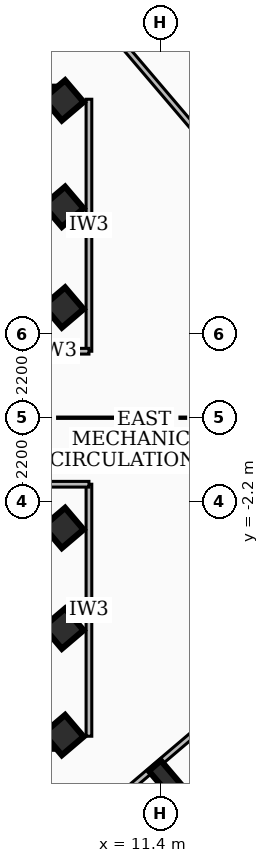
"""IFC4 building model, lengths in metres.
Left out: names, types, materials, properties, quantities, classifications, styles, units other than length and angle.
Written with IfcOpenShell. Run it as: python <this file> out.ifc"""

import sys

from ifc_helpers import new_model, si_unit, direction, frame, frame_2d, origin, origin_2d, place, context, subcontext, project, spatial, rectangle, i_section, extrude, element, save


model = new_model("IFC4")
c1 = context("Model", 3, precision=1e-05, world=origin(), true_north=direction((0.0, 1.0)))
c2 = subcontext(c1, "Body", "Model", "MODEL_VIEW")
j1 = project(units=[si_unit("LENGTHUNIT", "METRE"), si_unit("PLANEANGLEUNIT", "RADIAN")], contexts=[c1])
p1 = place(None, origin())
s1 = spatial("IfcSite", under=j1, at=p1, CompositionType="ELEMENT")
p2 = place(p1, origin())
s2 = spatial("IfcBuilding", under=s1, at=p2, CompositionType="ELEMENT")
p3 = place(p2, frame((0.0, 0.0, 239.4)))
s3 = spatial("IfcBuildingStorey", under=s2, at=p3, CompositionType="ELEMENT", Elevation=239.4)
for number, where, z_axis, x_axis in (
    (1, (-8.78, 8.51, 0.0), (0.0, 0.0, 1.0), (1.0, 0.0, 0.0)),
    (2, (8.78, -8.51, 0.0), (0.0, 0.0, 1.0), (-1.0, 0.0, 0.0)),
):
    element("IfcWall", number, at=place(p3, frame(where, z_axis=z_axis, x_axis=x_axis)), inside=s3, PredefinedType="SHEAR", context=c2, shape_type="SweptSolid", body=[
        extrude(rectangle(XDim=17.56, YDim=0.4, at=frame_2d((8.78, 0.0))), origin(), (0.0, 0.0, 1.0), 4.42),
    ])
for number, where, z_axis, x_axis in (
    (3, (8.85, -5.55, 0.0), (0.0, 0.0, 1.0), (0.762, 0.648, 0.0)),
    (4, (8.85, -2.9, 0.0), (0.0, 0.0, 1.0), (0.762, 0.648, 0.0)),
    (5, (8.85, 2.9, 0.0), (0.0, 0.0, 1.0), (0.762, 0.648, 0.0)),
    (6, (8.85, 5.55, 0.0), (0.0, 0.0, 1.0), (0.762, 0.648, 0.0)),
    (7, (8.85, -8.35, 0.0), (0.0, 0.0, 1.0), (0.762, 0.648, 0.0)),
    (8, (8.85, 8.35, 0.0), (0.0, 0.0, 1.0), (0.762, 0.648, 0.0)),
):
    element("IfcColumn", number, at=place(p3, frame(where, z_axis=z_axis, x_axis=x_axis)), inside=s3, PredefinedType="COLUMN", context=c2, shape_type="SweptSolid", body=[
        extrude(rectangle(XDim=0.75, YDim=0.75, at=origin_2d()), origin(), (0.0, 0.0, 1.0), 4.68),
    ])
p4 = place(p3, frame((11.554, -9.51, 0.0), z_axis=(0.0, 0.0, 1.0), x_axis=(0.761538307537, 0.648119901063, 0.0)))
e9 = element("IfcColumn", 9, at=p4, inside=s3, PredefinedType="COLUMN", context=c2, shape_type="SweptSolid", body=[
    extrude(i_section(OverallWidth=0.418, OverallDepth=0.927, WebThickness=0.019, FlangeThickness=0.032, at=origin_2d()), origin(), (0.0, 0.0, 1.0), 4.68),
])
p5 = place(p3, frame((9.52, 1.75, 0.0), z_axis=(0.0, 0.0, 1.0), x_axis=(0.0, 1.0, 0.0)))
e10 = element("IfcWall", 10, at=p5, inside=s3, PredefinedType="PARTITIONING", context=c2, shape_type="SweptSolid", body=[
    extrude(rectangle(XDim=6.63, YDim=0.15, at=frame_2d((3.315, 0.0))), origin(), (0.0, 0.0, 1.0), 2.212),
])
p6 = place(p3, frame((7.85, 1.75, 0.0), z_axis=(0.0, 0.0, 1.0), x_axis=(1.0, 0.0, 0.0)))
e11 = element("IfcWall", 11, at=p6, inside=s3, PredefinedType="PARTITIONING", context=c2, shape_type="SweptSolid", body=[
    extrude(rectangle(XDim=1.67, YDim=0.15, at=frame_2d((0.835, 0.0))), origin(), (0.0, 0.0, 1.0), 3.65),
])
p7 = place(p3, frame((9.52, -8.38, 0.0), z_axis=(0.0, 0.0, 1.0), x_axis=(0.0, 1.0, 0.0)))
e12 = element("IfcWall", 12, at=p7, inside=s3, PredefinedType="PARTITIONING", context=c2, shape_type="SweptSolid", body=[
    extrude(rectangle(XDim=6.63, YDim=0.15, at=frame_2d((3.315, 0.0))), origin(), (0.0, 0.0, 1.0), 2.212),
])
p8 = place(p3, frame((7.85, -1.75, 0.0), z_axis=(0.0, 0.0, 1.0), x_axis=(1.0, 0.0, 0.0)))
e13 = element("IfcWall", 13, at=p8, inside=s3, PredefinedType="PARTITIONING", context=c2, shape_type="SweptSolid", body=[
    extrude(rectangle(XDim=1.67, YDim=0.15, at=frame_2d((0.835, 0.0))), origin(), (0.0, 0.0, 1.0), 3.65),
])
p9 = place(p3, frame((4.045, 17.296, 0.0), z_axis=(0.0, 0.0, 1.0), x_axis=(0.648103934292, -0.761551896035, 0.0)))
e14 = element("IfcWall", 14, at=p9, inside=s3, PredefinedType="PARTITIONING", context=c2, shape_type="SweptSolid", body=[
    extrude(rectangle(XDim=20.5, YDim=0.15, at=frame_2d((10.25, 0.0))), origin(), (0.0, 0.0, 1.0), 2.212),
])
p10 = place(p9, frame((13.799, 0.0, 0.0)))
e15 = element("IfcOpeningElement", 15, at=p10, cuts=e14, PredefinedType="OPENING", context=c2, shape_type="SweptSolid", body=[
    extrude(rectangle(XDim=1.1, YDim=2.15, at=frame_2d((0.55, 1.075))), frame((0.0, 0.085, 0.0), z_axis=(0.0, -1.0, 0.0), x_axis=(1.0, 0.0, 0.0)), (0.0, 0.0, 1.0), 0.17),
])
p11 = place(p3, frame((10.58, 17.192, 0.0), z_axis=(0.0, 0.0, 1.0), x_axis=(0.648136838455, -0.761523892362, 0.0)))
e16 = element("IfcWall", 16, at=p11, inside=s3, PredefinedType="PARTITIONING", context=c2, shape_type="SweptSolid", body=[
    extrude(rectangle(XDim=13.07, YDim=0.15, at=frame_2d((6.535, 0.0))), origin(), (0.0, 0.0, 1.0), 2.212),
])
p12 = place(p11, frame((5.735, 0.0, 0.0)))
e17 = element("IfcOpeningElement", 17, at=p12, cuts=e16, PredefinedType="OPENING", context=c2, shape_type="SweptSolid", body=[
    extrude(rectangle(XDim=1.0, YDim=2.1, at=frame_2d((0.5, 1.05))), frame((0.0, 0.085, 0.0), z_axis=(0.0, -1.0, 0.0), x_axis=(1.0, 0.0, 0.0)), (0.0, 0.0, 1.0), 0.17),
])
p13 = place(p3, frame((17.296, -4.045, 0.0), z_axis=(0.0, 0.0, 1.0), x_axis=(-0.761551896035, -0.648103934292, 0.0)))
e18 = element("IfcWall", 18, at=p13, inside=s3, PredefinedType="PARTITIONING", context=c2, shape_type="SweptSolid", body=[
    extrude(rectangle(XDim=20.5, YDim=0.15, at=frame_2d((10.25, 0.0))), origin(), (0.0, 0.0, 1.0), 2.212),
])
p14 = place(p13, frame((9.999, 0.0, 0.0)))
e19 = element("IfcOpeningElement", 19, at=p14, cuts=e18, PredefinedType="OPENING", context=c2, shape_type="SweptSolid", body=[
    extrude(rectangle(XDim=1.1, YDim=2.15, at=frame_2d((0.55, 1.075))), frame((0.0, 0.085, 0.0), z_axis=(0.0, -1.0, 0.0), x_axis=(1.0, 0.0, 0.0)), (0.0, 0.0, 1.0), 0.17),
])
p15 = place(p3, frame((15.378, -8.449, 0.0), z_axis=(0.0, 0.0, 1.0), x_axis=(-0.761592155386, -0.648056624729, 0.0)))
e20 = element("IfcWall", 20, at=p15, inside=s3, PredefinedType="PARTITIONING", context=c2, shape_type="SweptSolid", body=[
    extrude(rectangle(XDim=13.07, YDim=0.15, at=frame_2d((6.535, 0.0))), origin(), (0.0, 0.0, 1.0), 2.212),
])
p16 = place(p15, frame((5.735, 0.0, 0.0)))
e21 = element("IfcOpeningElement", 21, at=p16, cuts=e20, PredefinedType="OPENING", context=c2, shape_type="SweptSolid", body=[
    extrude(rectangle(XDim=1.0, YDim=2.1, at=frame_2d((0.5, 1.05))), frame((0.0, 0.085, 0.0), z_axis=(0.0, -1.0, 0.0), x_axis=(1.0, 0.0, 0.0)), (0.0, 0.0, 1.0), 0.17),
])
save(model, sys.argv[1])
